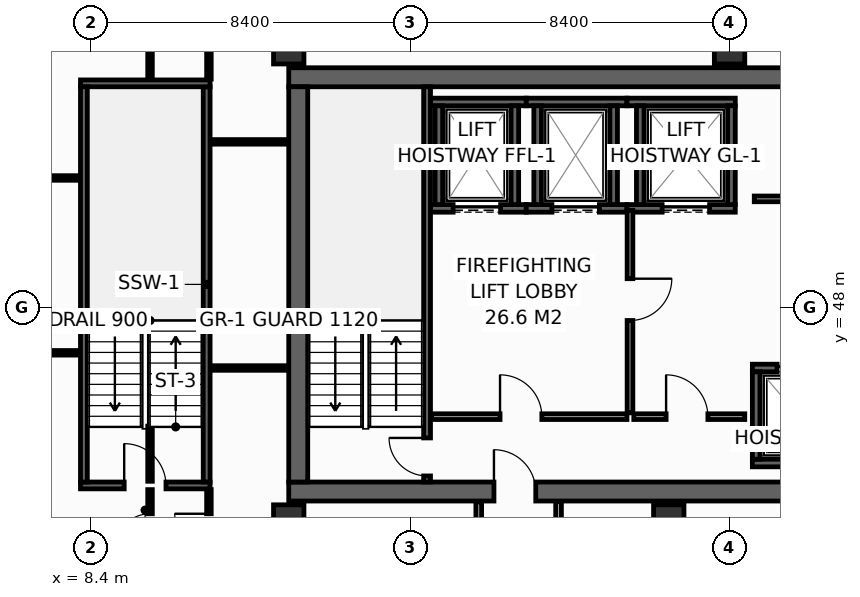
"""IFC4 building model, lengths in metres.
Left out: names, types, materials, properties, quantities, classifications, styles, units other than length and angle.
Written with IfcOpenShell. Run it as: python <this file> out.ifc"""

import sys

from ifc_helpers import new_model, si_unit, direction, frame, frame_2d, origin, origin_2d, place, context, subcontext, project, spatial, rectangle, hollow_rectangle, extrude, element, fill, save


model = new_model("IFC4")
c1 = context("Model", 3, precision=1e-05, world=origin(), true_north=direction((0.0, 1.0)))
c2 = subcontext(c1, "Body", "Model", "MODEL_VIEW")
j1 = project(units=[si_unit("LENGTHUNIT", "METRE"), si_unit("PLANEANGLEUNIT", "RADIAN")], contexts=[c1])
p1 = place(None, origin())
s1 = spatial("IfcSite", under=j1, at=p1, CompositionType="ELEMENT")
p2 = place(p1, origin())
s2 = spatial("IfcBuilding", under=s1, at=p2, CompositionType="ELEMENT")
p3 = place(p2, frame((0.0, 0.0, 186.6)))
s3 = spatial("IfcBuildingStorey", under=s2, at=p3, CompositionType="ELEMENT", Elevation=186.6)
p4 = place(p3, frame((13.6, 43.15, 0.0), z_axis=(0.0, 0.0, 1.0), x_axis=(1.0, 0.0, 0.0)))
e1 = element("IfcWall", 1, at=p4, inside=s3, PredefinedType="SHEAR", context=c2, shape_type="SweptSolid", body=[
    extrude(rectangle(XDim=32.7, YDim=0.5, at=frame_2d((16.35, 0.0))), origin(), (0.0, 0.0, 1.0), 3.55),
])
p5 = place(p4, frame((5.4, 0.0, 0.0)))
e2 = element("IfcOpeningElement", 2, at=p5, cuts=e1, PredefinedType="OPENING", context=c2, shape_type="SweptSolid", body=[
    extrude(rectangle(XDim=1.1, YDim=2.15, at=frame_2d((0.55, 1.075))), frame((0.0, 0.26, 0.0), z_axis=(0.0, -1.0, 0.0), x_axis=(1.0, 0.0, 0.0)), (0.0, 0.0, 1.0), 0.52),
])
p6 = place(p4, frame((25.6, 0.0, 0.0)))
e3 = element("IfcOpeningElement", 3, at=p6, cuts=e1, PredefinedType="OPENING", context=c2, shape_type="SweptSolid", body=[
    extrude(rectangle(XDim=1.1, YDim=2.15, at=frame_2d((0.55, 1.075))), frame((0.0, 0.26, 0.0), z_axis=(0.0, -1.0, 0.0), x_axis=(1.0, 0.0, 0.0)), (0.0, 0.0, 1.0), 0.52),
])
p7 = place(p3, frame((13.6, 54.05, 0.0), z_axis=(0.0, 0.0, 1.0), x_axis=(1.0, 0.0, 0.0)))
e4 = element("IfcWall", 4, at=p7, inside=s3, PredefinedType="SHEAR", context=c2, shape_type="SweptSolid", body=[
    extrude(rectangle(XDim=32.7, YDim=0.5, at=frame_2d((16.35, 0.0))), origin(), (0.0, 0.0, 1.0), 3.55),
])
p8 = place(p3, frame((13.85, 43.4, 0.0), z_axis=(0.0, 0.0, 1.0), x_axis=(0.0, 1.0, 0.0)))
e5 = element("IfcWall", 5, at=p8, inside=s3, PredefinedType="SHEAR", context=c2, shape_type="SweptSolid", body=[
    extrude(rectangle(XDim=10.4, YDim=0.5, at=frame_2d((5.2, 0.0))), origin(), (0.0, 0.0, 1.0), 3.55),
])
for number, where, z_axis, x_axis in (
    (6, (13.6, 54.8, 0.0), (0.0, 0.0, 1.0), (1.0, 0.0, 0.0)),
    (7, (25.2, 54.8, 0.0), (0.0, 0.0, 1.0), (1.0, 0.0, 0.0)),
    (8, (13.6, 42.4, 0.0), (0.0, 0.0, 1.0), (1.0, 0.0, 0.0)),
    (9, (23.6, 42.4, 0.0), (0.0, 0.0, 1.0), (1.0, 0.0, 0.0)),
):
    element("IfcColumn", number, at=place(p3, frame(where, z_axis=z_axis, x_axis=x_axis)), inside=s3, PredefinedType="COLUMN", context=c2, shape_type="SweptSolid", body=[
        extrude(hollow_rectangle(XDim=0.8, YDim=0.8, WallThickness=0.036, at=origin_2d()), origin(), (0.0, 0.0, 1.0), 3.8),
    ])
p9 = place(p3, frame((17.33, 50.6, 0.0), z_axis=(0.0, 0.0, 1.0), x_axis=(1.0, 0.0, 0.0)))
e10 = element("IfcWall", 10, at=p9, inside=s3, PredefinedType="SHEAR", context=c2, shape_type="SweptSolid", body=[
    extrude(rectangle(XDim=2.52, YDim=0.2, at=frame_2d((1.26, 0.0))), origin(), (0.0, 0.0, 1.0), 3.55),
])
p10 = place(p9, frame((0.595, 0.0, 0.0)))
e11 = element("IfcOpeningElement", 11, at=p10, cuts=e10, PredefinedType="OPENING", context=c2, shape_type="SweptSolid", body=[
    extrude(rectangle(XDim=1.25, YDim=2.3, at=frame_2d((0.625, 1.15))), frame((0.0, 0.11, 0.0), z_axis=(0.0, -1.0, 0.0), x_axis=(1.0, 0.0, 0.0)), (0.0, 0.0, 1.0), 0.22),
])
p11 = place(p3, frame((17.33, 53.4, 0.0), z_axis=(0.0, 0.0, 1.0), x_axis=(1.0, 0.0, 0.0)))
e12 = element("IfcWall", 12, at=p11, inside=s3, PredefinedType="SHEAR", context=c2, shape_type="SweptSolid", body=[
    extrude(rectangle(XDim=2.52, YDim=0.2, at=frame_2d((1.26, 0.0))), origin(), (0.0, 0.0, 1.0), 3.55),
])
for number, where, z_axis, x_axis in (
    (13, (17.55, 50.7, 0.0), (0.0, 0.0, 1.0), (0.0, 1.0, 0.0)),
    (14, (19.55, 50.7, 0.0), (0.0, 0.0, 1.0), (0.0, 1.0, 0.0)),
):
    element("IfcWall", number, at=place(p3, frame(where, z_axis=z_axis, x_axis=x_axis)), inside=s3, PredefinedType="SHEAR", context=c2, shape_type="SweptSolid", body=[
        extrude(rectangle(XDim=2.6, YDim=0.2, at=frame_2d((1.3, 0.0))), origin(), (0.0, 0.0, 1.0), 3.55),
    ])
p12 = place(p3, frame((19.85, 50.6, 0.0), z_axis=(0.0, 0.0, 1.0), x_axis=(1.0, 0.0, 0.0)))
e15 = element("IfcWall", 15, at=p12, inside=s3, PredefinedType="SHEAR", context=c2, shape_type="SweptSolid", body=[
    extrude(rectangle(XDim=2.65, YDim=0.2, at=frame_2d((1.325, 0.0))), origin(), (0.0, 0.0, 1.0), 3.55),
])
p13 = place(p12, frame((0.675, 0.0, 0.0)))
e16 = element("IfcOpeningElement", 16, at=p13, cuts=e15, PredefinedType="OPENING", context=c2, shape_type="SweptSolid", body=[
    extrude(rectangle(XDim=1.25, YDim=2.3, at=frame_2d((0.625, 1.15))), frame((0.0, 0.11, 0.0), z_axis=(0.0, -1.0, 0.0), x_axis=(1.0, 0.0, 0.0)), (0.0, 0.0, 1.0), 0.22),
])
p14 = place(p3, frame((19.85, 53.4, 0.0), z_axis=(0.0, 0.0, 1.0), x_axis=(1.0, 0.0, 0.0)))
e17 = element("IfcWall", 17, at=p14, inside=s3, PredefinedType="SHEAR", context=c2, shape_type="SweptSolid", body=[
    extrude(rectangle(XDim=2.65, YDim=0.2, at=frame_2d((1.325, 0.0))), origin(), (0.0, 0.0, 1.0), 3.55),
])
for number, where, z_axis, x_axis in (
    (18, (20.15, 50.7, 0.0), (0.0, 0.0, 1.0), (0.0, 1.0, 0.0)),
    (19, (22.15, 50.7, 0.0), (0.0, 0.0, 1.0), (0.0, 1.0, 0.0)),
):
    element("IfcWall", number, at=place(p3, frame(where, z_axis=z_axis, x_axis=x_axis)), inside=s3, PredefinedType="SHEAR", context=c2, shape_type="SweptSolid", body=[
        extrude(rectangle(XDim=2.6, YDim=0.2, at=frame_2d((1.3, 0.0))), origin(), (0.0, 0.0, 1.0), 3.55),
    ])
p15 = place(p3, frame((22.5, 50.6, 0.0), z_axis=(0.0, 0.0, 1.0), x_axis=(1.0, 0.0, 0.0)))
e20 = element("IfcWall", 20, at=p15, inside=s3, PredefinedType="SHEAR", context=c2, shape_type="SweptSolid", body=[
    extrude(rectangle(XDim=2.85, YDim=0.2, at=frame_2d((1.425, 0.0))), origin(), (0.0, 0.0, 1.0), 3.55),
])
p16 = place(p15, frame((0.925, 0.0, 0.0)))
e21 = element("IfcOpeningElement", 21, at=p16, cuts=e20, PredefinedType="OPENING", context=c2, shape_type="SweptSolid", body=[
    extrude(rectangle(XDim=1.25, YDim=2.3, at=frame_2d((0.625, 1.15))), frame((0.0, 0.11, 0.0), z_axis=(0.0, -1.0, 0.0), x_axis=(1.0, 0.0, 0.0)), (0.0, 0.0, 1.0), 0.22),
])
p17 = place(p3, frame((22.5, 53.4, 0.0), z_axis=(0.0, 0.0, 1.0), x_axis=(1.0, 0.0, 0.0)))
e22 = element("IfcWall", 22, at=p17, inside=s3, PredefinedType="SHEAR", context=c2, shape_type="SweptSolid", body=[
    extrude(rectangle(XDim=2.85, YDim=0.2, at=frame_2d((1.425, 0.0))), origin(), (0.0, 0.0, 1.0), 3.55),
])
for number, where, z_axis, x_axis in (
    (23, (22.85, 50.7, 0.0), (0.0, 0.0, 1.0), (0.0, 1.0, 0.0)),
    (24, (25.25, 50.7, 0.0), (0.0, 0.0, 1.0), (0.0, 1.0, 0.0)),
):
    element("IfcWall", number, at=place(p3, frame(where, z_axis=z_axis, x_axis=x_axis)), inside=s3, PredefinedType="SHEAR", context=c2, shape_type="SweptSolid", body=[
        extrude(rectangle(XDim=2.6, YDim=0.2, at=frame_2d((1.3, 0.0))), origin(), (0.0, 0.0, 1.0), 3.55),
    ])
p18 = place(p3, frame((25.8, 43.9, 0.0), z_axis=(0.0, 0.0, 1.0), x_axis=(1.0, 0.0, 0.0)))
e25 = element("IfcWall", 25, at=p18, inside=s3, PredefinedType="SHEAR", context=c2, shape_type="SweptSolid", body=[
    extrude(rectangle(XDim=2.575, YDim=0.2, at=frame_2d((1.288, 0.0))), origin(), (0.0, 0.0, 1.0), 3.55),
])
p19 = place(p3, frame((25.8, 46.4, 0.0), z_axis=(0.0, 0.0, 1.0), x_axis=(1.0, 0.0, 0.0)))
e26 = element("IfcWall", 26, at=p19, inside=s3, PredefinedType="SHEAR", context=c2, shape_type="SweptSolid", body=[
    extrude(rectangle(XDim=2.575, YDim=0.2, at=frame_2d((1.288, 0.0))), origin(), (0.0, 0.0, 1.0), 3.55),
])
p20 = place(p19, frame((0.65, 0.0, 0.0)))
e27 = element("IfcOpeningElement", 27, at=p20, cuts=e26, PredefinedType="OPENING", context=c2, shape_type="SweptSolid", body=[
    extrude(rectangle(XDim=1.1, YDim=2.2, at=frame_2d((0.55, 1.1))), frame((0.0, 0.11, 0.0), z_axis=(0.0, -1.0, 0.0), x_axis=(1.0, 0.0, 0.0)), (0.0, 0.0, 1.0), 0.22),
])
p21 = place(p3, frame((25.9, 44.0, 0.0), z_axis=(0.0, 0.0, 1.0), x_axis=(0.0, 1.0, 0.0)))
e28 = element("IfcWall", 28, at=p21, inside=s3, PredefinedType="SHEAR", context=c2, shape_type="SweptSolid", body=[
    extrude(rectangle(XDim=2.3, YDim=0.2, at=frame_2d((1.15, 0.0))), origin(), (0.0, 0.0, 1.0), 3.55),
])
p22 = place(p3, frame((17.24, 43.4, 0.0), z_axis=(0.0, 0.0, 1.0), x_axis=(0.0, 1.0, 0.0)))
e29 = element("IfcWall", 29, at=p22, inside=s3, PredefinedType="SHEAR", context=c2, shape_type="SweptSolid", body=[
    extrude(rectangle(XDim=10.4, YDim=0.18, at=frame_2d((5.2, 0.0))), origin(), (0.0, 0.0, 1.0), 3.55),
])
p23 = place(p22, frame((0.16, 0.0, 0.0)))
e30 = element("IfcOpeningElement", 30, at=p23, cuts=e29, PredefinedType="OPENING", context=c2, shape_type="SweptSolid", body=[
    extrude(rectangle(XDim=1.0, YDim=2.15, at=frame_2d((0.5, 1.075))), frame((0.0, 0.1, 0.0), z_axis=(0.0, -1.0, 0.0), x_axis=(1.0, 0.0, 0.0)), (0.0, 0.0, 1.0), 0.2),
])
p24 = place(p3, frame((8.12, 43.31, 0.0), z_axis=(0.0, 0.0, 1.0), x_axis=(1.0, 0.0, 0.0)))
e31 = element("IfcWall", 31, at=p24, inside=s3, PredefinedType="SHEAR", context=c2, shape_type="SweptSolid", body=[
    extrude(rectangle(XDim=3.41, YDim=0.18, at=frame_2d((1.705, 0.0))), origin(), (0.0, 0.0, 1.0), 3.55),
])
p25 = place(p24, frame((1.15, 0.0, 0.0)))
e32 = element("IfcOpeningElement", 32, at=p25, cuts=e31, PredefinedType="OPENING", context=c2, shape_type="SweptSolid", body=[
    extrude(rectangle(XDim=1.1, YDim=2.15, at=frame_2d((0.55, 1.075))), frame((0.0, 0.1, 0.0), z_axis=(0.0, -1.0, 0.0), x_axis=(1.0, 0.0, 0.0)), (0.0, 0.0, 1.0), 0.2),
])
p26 = place(p3, frame((11.44, 43.4, 0.0), z_axis=(0.0, 0.0, 1.0), x_axis=(0.0, 1.0, 0.0)))
e33 = element("IfcWall", 33, at=p26, inside=s3, PredefinedType="SHEAR", context=c2, shape_type="SweptSolid", body=[
    extrude(rectangle(XDim=10.4, YDim=0.18, at=frame_2d((5.2, 0.0))), origin(), (0.0, 0.0, 1.0), 3.55),
])
p27 = place(p3, frame((11.53, 53.89, 0.0), z_axis=(0.0, 0.0, 1.0), x_axis=(-1.0, 0.0, 0.0)))
e34 = element("IfcWall", 34, at=p27, inside=s3, PredefinedType="SHEAR", context=c2, shape_type="SweptSolid", body=[
    extrude(rectangle(XDim=3.41, YDim=0.18, at=frame_2d((1.705, 0.0))), origin(), (0.0, 0.0, 1.0), 3.55),
])
p28 = place(p3, frame((8.21, 53.8, 0.0), z_axis=(0.0, 0.0, 1.0), x_axis=(0.0, -1.0, 0.0)))
e35 = element("IfcWall", 35, at=p28, inside=s3, PredefinedType="SHEAR", context=c2, shape_type="SweptSolid", body=[
    extrude(rectangle(XDim=10.4, YDim=0.18, at=frame_2d((5.2, 0.0))), origin(), (0.0, 0.0, 1.0), 3.55),
])
p29 = place(p3, frame((17.36, 45.12, 0.0), z_axis=(0.0, 0.0, 1.0), x_axis=(1.0, 0.0, 0.0)))
e36 = element("IfcWall", 36, at=p29, inside=s3, PredefinedType="PARTITIONING", context=c2, shape_type="SweptSolid", body=[
    extrude(rectangle(XDim=5.14, YDim=0.15, at=frame_2d((2.57, 0.0))), origin(), (0.0, 0.0, 1.0), 3.55),
])
p30 = place(p29, frame((1.8, 0.0, 0.0)))
e37 = element("IfcOpeningElement", 37, at=p30, cuts=e36, PredefinedType="OPENING", context=c2, shape_type="SweptSolid", body=[
    extrude(rectangle(XDim=1.1, YDim=2.15, at=frame_2d((0.55, 1.075))), frame((0.0, 0.085, 0.0), z_axis=(0.0, -1.0, 0.0), x_axis=(1.0, 0.0, 0.0)), (0.0, 0.0, 1.0), 0.17),
])
p31 = place(p3, frame((22.58, 50.55, 0.0), z_axis=(0.0, 0.0, 1.0), x_axis=(0.0, -1.0, 0.0)))
e38 = element("IfcWall", 38, at=p31, inside=s3, PredefinedType="PARTITIONING", context=c2, shape_type="SweptSolid", body=[
    extrude(rectangle(XDim=5.33, YDim=0.15, at=frame_2d((2.665, 0.0))), origin(), (0.0, 0.0, 1.0), 3.55),
])
p32 = place(p31, frame((1.8, 0.0, 0.0)))
e39 = element("IfcOpeningElement", 39, at=p32, cuts=e38, PredefinedType="OPENING", context=c2, shape_type="SweptSolid", body=[
    extrude(rectangle(XDim=1.1, YDim=2.15, at=frame_2d((0.55, 1.075))), frame((0.0, 0.085, 0.0), z_axis=(0.0, -1.0, 0.0), x_axis=(1.0, 0.0, 0.0)), (0.0, 0.0, 1.0), 0.17),
])
p33 = place(p3, frame((22.68, 45.12, 0.0), z_axis=(0.0, 0.0, 1.0), x_axis=(1.0, 0.0, 0.0)))
e40 = element("IfcWall", 40, at=p33, inside=s3, PredefinedType="PARTITIONING", context=c2, shape_type="SweptSolid", body=[
    extrude(rectangle(XDim=2.92, YDim=0.15, at=frame_2d((1.46, 0.0))), origin(), (0.0, 0.0, 1.0), 3.55),
])
p34 = place(p33, frame((0.85, 0.0, 0.0)))
e41 = element("IfcOpeningElement", 41, at=p34, cuts=e40, PredefinedType="OPENING", context=c2, shape_type="SweptSolid", body=[
    extrude(rectangle(XDim=1.1, YDim=2.15, at=frame_2d((0.55, 1.075))), frame((0.0, 0.085, 0.0), z_axis=(0.0, -1.0, 0.0), x_axis=(1.0, 0.0, 0.0)), (0.0, 0.0, 1.0), 0.17),
])
p35 = place(p3, frame((25.85, 50.85, 0.0), z_axis=(0.0, 0.0, 1.0), x_axis=(1.0, 0.0, 0.0)))
e42 = element("IfcWall", 42, at=p35, inside=s3, PredefinedType="PARTITIONING", context=c2, shape_type="SweptSolid", body=[
    extrude(rectangle(XDim=7.65, YDim=0.15, at=frame_2d((3.825, 0.0))), origin(), (0.0, 0.0, 1.0), 3.55),
])
p36 = place(p35, frame((1.25, 0.0, 0.0)))
e43 = element("IfcOpeningElement", 43, at=p36, cuts=e42, PredefinedType="OPENING", context=c2, shape_type="SweptSolid", body=[
    extrude(rectangle(XDim=0.95, YDim=2.15, at=frame_2d((0.475, 1.075))), frame((0.0, 0.085, 0.0), z_axis=(0.0, -1.0, 0.0), x_axis=(1.0, 0.0, 0.0)), (0.0, 0.0, 1.0), 0.17),
])
p37 = place(p3, frame((11.55, 52.35, 0.0), z_axis=(0.0, 0.0, 1.0), x_axis=(1.0, 0.0, 0.0)))
e44 = element("IfcWall", 44, at=p37, inside=s3, PredefinedType="PARTITIONING", context=c2, shape_type="SweptSolid", body=[
    extrude(rectangle(XDim=2.03, YDim=0.12, at=frame_2d((1.015, 0.0))), origin(), (0.0, 0.0, 1.0), 3.55),
])
p38 = place(p3, frame((11.5, 54.0, 0.0), z_axis=(0.0, 0.0, 1.0), x_axis=(0.0, 1.0, 0.0)))
e45 = element("IfcWall", 45, at=p38, inside=s3, PredefinedType="PARTITIONING", context=c2, shape_type="SweptSolid", body=[
    extrude(rectangle(XDim=1.995, YDim=0.12, at=frame_2d((0.998, 0.0))), origin(), (0.0, 0.0, 1.0), 2.935),
])
p39 = place(p3, frame((5.021, 46.8, 0.0), z_axis=(0.0, 0.0, 1.0), x_axis=(1.0, 0.0, 0.0)))
e46 = element("IfcWall", 46, at=p39, inside=s3, PredefinedType="PARTITIONING", context=c2, shape_type="SweptSolid", body=[
    extrude(rectangle(XDim=3.079, YDim=0.12, at=frame_2d((1.54, 0.0))), origin(), (0.0, 0.0, 1.0), 2.835),
])
p40 = place(p3, frame((4.242, 51.4, 0.0), z_axis=(0.0, 0.0, 1.0), x_axis=(1.0, 0.0, 0.0)))
e47 = element("IfcWall", 47, at=p40, inside=s3, PredefinedType="PARTITIONING", context=c2, shape_type="SweptSolid", body=[
    extrude(rectangle(XDim=3.858, YDim=0.12, at=frame_2d((1.929, 0.0))), origin(), (0.0, 0.0, 1.0), 2.835),
])
p41 = place(p3, frame((9.95, 41.03, 0.0), z_axis=(0.0, 0.0, 1.0), x_axis=(0.0, 1.0, 0.0)))
e48 = element("IfcWall", 48, at=p41, inside=s3, PredefinedType="PARTITIONING", context=c2, shape_type="SweptSolid", body=[
    extrude(rectangle(XDim=2.17, YDim=0.12, at=frame_2d((1.085, 0.0))), origin(), (0.0, 0.0, 1.0), 2.835),
])
p42 = place(p41, frame((0.635, 0.0, 0.0)))
e49 = element("IfcOpeningElement", 49, at=p42, cuts=e48, PredefinedType="OPENING", context=c2, shape_type="SweptSolid", body=[
    extrude(rectangle(XDim=0.9, YDim=2.1, at=frame_2d((0.45, 1.05))), frame((0.0, 0.07, 0.0), z_axis=(0.0, -1.0, 0.0), x_axis=(1.0, 0.0, 0.0)), (0.0, 0.0, 1.0), 0.14),
])
p43 = place(p3, frame((9.95, 43.42, 0.0), z_axis=(0.0, 0.0, 1.0), x_axis=(0.0, 1.0, 0.0)))
e50 = element("IfcWall", 50, at=p43, inside=s3, PredefinedType="PARTITIONING", context=c2, shape_type="SweptSolid", body=[
    extrude(rectangle(XDim=1.45, YDim=0.12, at=frame_2d((0.725, 0.0))), origin(), (0.0, 0.0, 1.0), 3.55),
])
p44 = place(p3, frame((9.95, 54.0, 0.0), z_axis=(0.0, 0.0, 1.0), x_axis=(0.0, 1.0, 0.0)))
e51 = element("IfcWall", 51, at=p44, inside=s3, PredefinedType="PARTITIONING", context=c2, shape_type="SweptSolid", body=[
    extrude(rectangle(XDim=1.995, YDim=0.12, at=frame_2d((0.998, 0.0))), origin(), (0.0, 0.0, 1.0), 2.935),
])
p45 = place(p3, frame((11.55, 46.4, 0.0), z_axis=(0.0, 0.0, 1.0), x_axis=(1.0, 0.0, 0.0)))
e52 = element("IfcWall", 52, at=p45, inside=s3, PredefinedType="PARTITIONING", context=c2, shape_type="SweptSolid", body=[
    extrude(rectangle(XDim=2.03, YDim=0.12, at=frame_2d((1.015, 0.0))), origin(), (0.0, 0.0, 1.0), 3.55),
])
p46 = place(p3, frame((11.5, 41.03, 0.0), z_axis=(0.0, 0.0, 1.0), x_axis=(0.0, 1.0, 0.0)))
e53 = element("IfcWall", 53, at=p46, inside=s3, PredefinedType="PARTITIONING", context=c2, shape_type="SweptSolid", body=[
    extrude(rectangle(XDim=2.17, YDim=0.12, at=frame_2d((1.085, 0.0))), origin(), (0.0, 0.0, 1.0), 2.835),
])
p47 = place(p46, frame((0.635, 0.0, 0.0)))
e54 = element("IfcOpeningElement", 54, at=p47, cuts=e53, PredefinedType="OPENING", context=c2, shape_type="SweptSolid", body=[
    extrude(rectangle(XDim=0.9, YDim=2.1, at=frame_2d((0.45, 1.05))), frame((0.0, 0.07, 0.0), z_axis=(0.0, -1.0, 0.0), x_axis=(1.0, 0.0, 0.0)), (0.0, 0.0, 1.0), 0.14),
])
p48 = place(p3, frame((13.8, 41.03, 0.0), z_axis=(0.0, 0.0, 1.0), x_axis=(0.0, 1.0, 0.0)))
e55 = element("IfcWall", 55, at=p48, inside=s3, PredefinedType="PARTITIONING", context=c2, shape_type="SweptSolid", body=[
    extrude(rectangle(XDim=1.85, YDim=0.15, at=frame_2d((0.925, 0.0))), origin(), (0.0, 0.0, 1.0), 3.55),
])
for number, where, z_axis, x_axis in (
    (56, (18.6, 40.95, 0.0), (0.0, 0.0, 1.0), (0.0, 1.0, 0.0)),
    (57, (20.7, 40.95, 0.0), (0.0, 0.0, 1.0), (0.0, 1.0, 0.0)),
):
    element("IfcWall", number, at=place(p3, frame(where, z_axis=z_axis, x_axis=x_axis)), inside=s3, PredefinedType="PARTITIONING", context=c2, shape_type="SweptSolid", body=[
        extrude(rectangle(XDim=1.93, YDim=0.15, at=frame_2d((0.965, 0.0))), origin(), (0.0, 0.0, 1.0), 3.55),
    ])
p49 = place(p10, origin())
e58 = element("IfcDoor", 58, at=p49, inside=s3, OperationType="SLIDING_TO_LEFT", PredefinedType="DOOR", context=c2, shape_type="SweptSolid", body=[
    extrude(rectangle(XDim=1.25, YDim=2.3, at=frame_2d((0.625, 1.15))), frame((0.0, 0.025, 0.0), z_axis=(0.0, -1.0, 0.0), x_axis=(1.0, 0.0, 0.0)), (0.0, 0.0, 1.0), 0.05),
])
fill(e11, e58)
p50 = place(p13, origin())
e59 = element("IfcDoor", 59, at=p50, inside=s3, OperationType="SLIDING_TO_LEFT", PredefinedType="DOOR", context=c2, shape_type="SweptSolid", body=[
    extrude(rectangle(XDim=1.25, YDim=2.3, at=frame_2d((0.625, 1.15))), frame((0.0, 0.025, 0.0), z_axis=(0.0, -1.0, 0.0), x_axis=(1.0, 0.0, 0.0)), (0.0, 0.0, 1.0), 0.05),
])
fill(e16, e59)
p51 = place(p16, origin())
e60 = element("IfcDoor", 60, at=p51, inside=s3, OperationType="SLIDING_TO_LEFT", PredefinedType="DOOR", context=c2, shape_type="SweptSolid", body=[
    extrude(rectangle(XDim=1.25, YDim=2.3, at=frame_2d((0.625, 1.15))), frame((0.0, 0.025, 0.0), z_axis=(0.0, -1.0, 0.0), x_axis=(1.0, 0.0, 0.0)), (0.0, 0.0, 1.0), 0.05),
])
fill(e21, e60)
p52 = place(p20, origin())
e61 = element("IfcDoor", 61, at=p52, inside=s3, OperationType="SLIDING_TO_LEFT", PredefinedType="DOOR", context=c2, shape_type="SweptSolid", body=[
    extrude(rectangle(XDim=1.1, YDim=2.2, at=frame_2d((0.55, 1.1))), frame((0.0, 0.025, 0.0), z_axis=(0.0, -1.0, 0.0), x_axis=(1.0, 0.0, 0.0)), (0.0, 0.0, 1.0), 0.05),
])
fill(e27, e61)
p53 = place(p23, origin())
e62 = element("IfcDoor", 62, at=p53, inside=s3, OperationType="SINGLE_SWING_RIGHT", PredefinedType="DOOR", context=c2, shape_type="SweptSolid", body=[
    extrude(rectangle(XDim=1.0, YDim=2.15, at=frame_2d((0.5, 1.075))), frame((0.0, 0.025, 0.0), z_axis=(0.0, -1.0, 0.0), x_axis=(1.0, 0.0, 0.0)), (0.0, 0.0, 1.0), 0.05),
])
fill(e30, e62)
p54 = place(p25, origin())
e63 = element("IfcDoor", 63, at=p54, inside=s3, OperationType="SINGLE_SWING_LEFT", PredefinedType="DOOR", context=c2, shape_type="SweptSolid", body=[
    extrude(rectangle(XDim=1.1, YDim=2.15, at=frame_2d((0.55, 1.075))), frame((0.0, 0.025, 0.0), z_axis=(0.0, -1.0, 0.0), x_axis=(1.0, 0.0, 0.0)), (0.0, 0.0, 1.0), 0.05),
])
fill(e32, e63)
p55 = place(p30, origin())
e64 = element("IfcDoor", 64, at=p55, inside=s3, OperationType="SINGLE_SWING_LEFT", PredefinedType="DOOR", context=c2, shape_type="SweptSolid", body=[
    extrude(rectangle(XDim=1.1, YDim=2.15, at=frame_2d((0.55, 1.075))), frame((0.0, 0.025, 0.0), z_axis=(0.0, -1.0, 0.0), x_axis=(1.0, 0.0, 0.0)), (0.0, 0.0, 1.0), 0.05),
])
fill(e37, e64)
p56 = place(p32, origin())
e65 = element("IfcDoor", 65, at=p56, inside=s3, OperationType="SINGLE_SWING_LEFT", PredefinedType="DOOR", context=c2, shape_type="SweptSolid", body=[
    extrude(rectangle(XDim=1.1, YDim=2.15, at=frame_2d((0.55, 1.075))), frame((0.0, 0.025, 0.0), z_axis=(0.0, -1.0, 0.0), x_axis=(1.0, 0.0, 0.0)), (0.0, 0.0, 1.0), 0.05),
])
fill(e39, e65)
p57 = place(p34, origin())
e66 = element("IfcDoor", 66, at=p57, inside=s3, OperationType="SINGLE_SWING_LEFT", PredefinedType="DOOR", context=c2, shape_type="SweptSolid", body=[
    extrude(rectangle(XDim=1.1, YDim=2.15, at=frame_2d((0.55, 1.075))), frame((0.0, 0.025, 0.0), z_axis=(0.0, -1.0, 0.0), x_axis=(1.0, 0.0, 0.0)), (0.0, 0.0, 1.0), 0.05),
])
fill(e41, e66)
p58 = place(p5, origin())
e67 = element("IfcDoor", 67, at=p58, inside=s3, OperationType="SINGLE_SWING_LEFT", PredefinedType="DOOR", context=c2, shape_type="SweptSolid", body=[
    extrude(rectangle(XDim=1.1, YDim=2.15, at=frame_2d((0.55, 1.075))), frame((0.0, 0.025, 0.0), z_axis=(0.0, -1.0, 0.0), x_axis=(1.0, 0.0, 0.0)), (0.0, 0.0, 1.0), 0.05),
])
fill(e2, e67)
p59 = place(p42, origin())
e68 = element("IfcDoor", 68, at=p59, inside=s3, OperationType="SINGLE_SWING_LEFT", PredefinedType="DOOR", context=c2, shape_type="SweptSolid", body=[
    extrude(rectangle(XDim=0.9, YDim=2.1, at=frame_2d((0.45, 1.05))), frame((0.0, 0.025, 0.0), z_axis=(0.0, -1.0, 0.0), x_axis=(1.0, 0.0, 0.0)), (0.0, 0.0, 1.0), 0.05),
])
fill(e49, e68)
p60 = place(p47, origin())
e69 = element("IfcDoor", 69, at=p60, inside=s3, OperationType="SINGLE_SWING_RIGHT", PredefinedType="DOOR", context=c2, shape_type="SweptSolid", body=[
    extrude(rectangle(XDim=0.9, YDim=2.1, at=frame_2d((0.45, 1.05))), frame((0.0, 0.025, 0.0), z_axis=(0.0, -1.0, 0.0), x_axis=(1.0, 0.0, 0.0)), (0.0, 0.0, 1.0), 0.05),
])
fill(e54, e69)
save(model, sys.argv[1])
